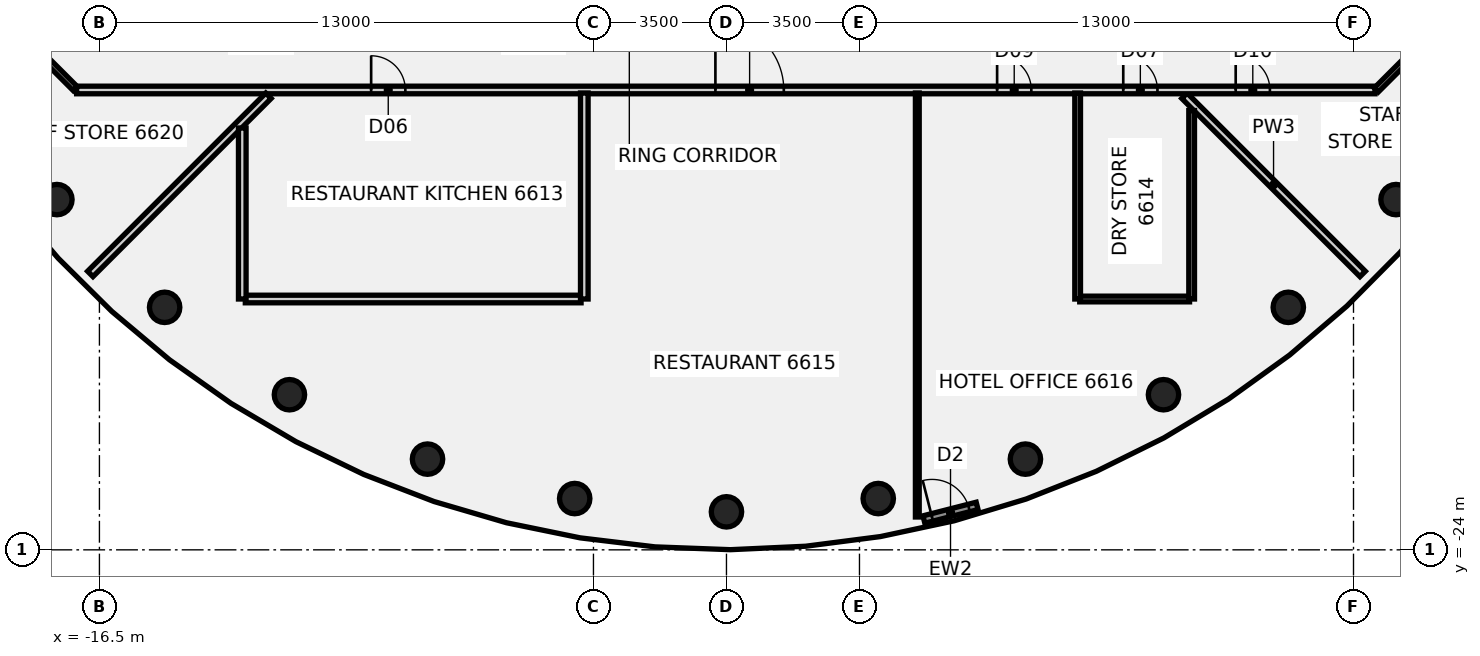
"""IFC4 building model, lengths in metres.
Left out: names, types, materials, properties, quantities, classifications, styles, units other than length and angle.
Written with IfcOpenShell. Run it as: python <this file> out.ifc"""

import sys

from ifc_helpers import new_model, si_unit, direction, frame, frame_2d, origin, origin_2d, place, context, subcontext, project, spatial, rectangle, circle, extrude, element, fill, save


model = new_model("IFC4")
c1 = context("Model", 3, precision=1e-05, world=origin(), true_north=direction((0.0, 1.0)))
c2 = subcontext(c1, "Body", "Model", "MODEL_VIEW")
j1 = project(units=[si_unit("LENGTHUNIT", "METRE"), si_unit("PLANEANGLEUNIT", "RADIAN")], contexts=[c1])
p1 = place(None, origin())
s1 = spatial("IfcSite", under=j1, at=p1, CompositionType="ELEMENT")
p2 = place(p1, origin())
s2 = spatial("IfcBuilding", under=s1, at=p2, CompositionType="ELEMENT")
p3 = place(p2, frame((0.0, 0.0, 260.4)))
s3 = spatial("IfcBuildingStorey", under=s2, at=p3, CompositionType="ELEMENT", Elevation=260.4)
for number, where, z_axis, x_axis in (
    (1, (-17.619, -14.784, -0.14), (0.0, 0.0, 1.0), (1.0, 0.0, 0.0)),
    (2, (-14.784, -17.619, -0.14), (0.0, 0.0, 1.0), (1.0, 0.0, 0.0)),
    (3, (-11.5, -19.919, -0.14), (0.0, 0.0, 1.0), (1.0, 0.0, 0.0)),
    (4, (-7.866, -21.613, -0.14), (0.0, 0.0, 1.0), (1.0, 0.0, 0.0)),
    (5, (-3.994, -22.651, -0.14), (0.0, 0.0, 1.0), (1.0, 0.0, 0.0)),
    (6, (0.0, -23.0, -0.14), (0.0, 0.0, 1.0), (1.0, 0.0, 0.0)),
    (7, (3.994, -22.651, -0.14), (0.0, 0.0, 1.0), (1.0, 0.0, 0.0)),
    (8, (7.866, -21.613, -0.14), (0.0, 0.0, 1.0), (1.0, 0.0, 0.0)),
    (9, (11.5, -19.919, -0.14), (0.0, 0.0, 1.0), (1.0, 0.0, 0.0)),
    (10, (14.784, -17.619, -0.14), (0.0, 0.0, 1.0), (1.0, 0.0, 0.0)),
    (11, (17.619, -14.784, -0.14), (0.0, 0.0, 1.0), (1.0, 0.0, 0.0)),
):
    element("IfcColumn", number, at=place(p3, frame(where, z_axis=z_axis, x_axis=x_axis)), inside=s3, PredefinedType="COLUMN", context=c2, shape_type="SweptSolid", body=[
        extrude(circle(Radius=0.4, at=origin_2d()), origin(), (0.0, 0.0, 1.0), 3.6),
    ])
p4 = place(p3, frame((-18.872, -10.128, 0.0), z_axis=(0.0, 0.0, 1.0), x_axis=(0.707106781187, -0.707106781187, 0.0)))
e12 = element("IfcWall", 12, at=p4, inside=s3, PredefinedType="PARTITIONING", context=c2, shape_type="SweptSolid", body=[
    extrude(rectangle(XDim=2.455, YDim=0.15, at=frame_2d((1.228, 0.0))), origin(), (0.0, 0.0, 1.0), 2.864),
])
p5 = place(p3, frame((12.052, -12.052, 0.0), z_axis=(0.0, 0.0, 1.0), x_axis=(0.707106781187, -0.707106781187, 0.0)))
e13 = element("IfcWall", 13, at=p5, inside=s3, PredefinedType="PARTITIONING", context=c2, shape_type="SweptSolid", body=[
    extrude(rectangle(XDim=6.631, YDim=0.2, at=frame_2d((3.315, 0.0))), origin(), (0.0, 0.0, 1.0), 2.864),
])
p6 = place(p3, frame((-17.1, -11.9, 0.0), z_axis=(0.0, 0.0, 1.0), x_axis=(1.0, 0.0, 0.0)))
e14 = element("IfcWall", 14, at=p6, inside=s3, PredefinedType="PARTITIONING", context=c2, shape_type="SweptSolid", body=[
    extrude(rectangle(XDim=34.165, YDim=0.2, at=frame_2d((17.083, 0.0))), origin(), (0.0, 0.0, 1.0), 2.864),
])
p7 = place(p6, frame((7.75, 0.0, 0.0)))
e15 = element("IfcOpeningElement", 15, at=p7, cuts=e14, PredefinedType="OPENING", context=c2, shape_type="SweptSolid", body=[
    extrude(rectangle(XDim=0.9, YDim=2.1, at=frame_2d((0.45, 1.05))), frame((0.0, 0.11, 0.0), z_axis=(0.0, -1.0, 0.0), x_axis=(1.0, 0.0, 0.0)), (0.0, 0.0, 1.0), 0.22),
])
p8 = place(p6, frame((27.541, 0.0, 0.0)))
e16 = element("IfcOpeningElement", 16, at=p8, cuts=e14, PredefinedType="OPENING", context=c2, shape_type="SweptSolid", body=[
    extrude(rectangle(XDim=0.9, YDim=2.1, at=frame_2d((0.45, 1.05))), frame((0.0, 0.11, 0.0), z_axis=(0.0, -1.0, 0.0), x_axis=(1.0, 0.0, 0.0)), (0.0, 0.0, 1.0), 0.22),
])
p9 = place(p6, frame((16.809, 0.0, 0.0)))
e17 = element("IfcOpeningElement", 17, at=p9, cuts=e14, PredefinedType="OPENING", context=c2, shape_type="SweptSolid", body=[
    extrude(rectangle(XDim=1.8, YDim=2.1, at=frame_2d((0.9, 1.05))), frame((0.0, 0.11, 0.0), z_axis=(0.0, -1.0, 0.0), x_axis=(1.0, 0.0, 0.0)), (0.0, 0.0, 1.0), 0.22),
])
p10 = place(p6, frame((24.222, 0.0, 0.0)))
e18 = element("IfcOpeningElement", 18, at=p10, cuts=e14, PredefinedType="OPENING", context=c2, shape_type="SweptSolid", body=[
    extrude(rectangle(XDim=0.9, YDim=2.1, at=frame_2d((0.45, 1.05))), frame((0.0, 0.11, 0.0), z_axis=(0.0, -1.0, 0.0), x_axis=(1.0, 0.0, 0.0)), (0.0, 0.0, 1.0), 0.22),
])
p11 = place(p6, frame((30.5, 0.0, 0.0)))
e19 = element("IfcOpeningElement", 19, at=p11, cuts=e14, PredefinedType="OPENING", context=c2, shape_type="SweptSolid", body=[
    extrude(rectangle(XDim=0.9, YDim=2.1, at=frame_2d((0.45, 1.05))), frame((0.0, 0.11, 0.0), z_axis=(0.0, -1.0, 0.0), x_axis=(1.0, 0.0, 0.0)), (0.0, 0.0, 1.0), 0.22),
])
p12 = place(p3, frame((-12.661, -17.4, 0.0), z_axis=(0.0, 0.0, 1.0), x_axis=(1.0, 0.0, 0.0)))
e20 = element("IfcWall", 20, at=p12, inside=s3, PredefinedType="PARTITIONING", context=c2, shape_type="SweptSolid", body=[
    extrude(rectangle(XDim=8.835, YDim=0.2, at=frame_2d((4.417, 0.0))), origin(), (0.0, 0.0, 1.0), 2.864),
])
p13 = place(p3, frame((9.296, -17.4, 0.0), z_axis=(0.0, 0.0, 1.0), x_axis=(1.0, 0.0, 0.0)))
e21 = element("IfcWall", 21, at=p13, inside=s3, PredefinedType="PARTITIONING", context=c2, shape_type="SweptSolid", body=[
    extrude(rectangle(XDim=2.89, YDim=0.15, at=frame_2d((1.445, 0.0))), origin(), (0.0, 0.0, 1.0), 2.864),
])
p14 = place(p3, frame((-16.74, -16.74, 0.0), z_axis=(0.0, 0.0, 1.0), x_axis=(0.707106781187, 0.707106781187, 0.0)))
e22 = element("IfcWall", 22, at=p14, inside=s3, PredefinedType="PARTITIONING", context=c2, shape_type="SweptSolid", body=[
    extrude(rectangle(XDim=6.631, YDim=0.2, at=frame_2d((3.315, 0.0))), origin(), (0.0, 0.0, 1.0), 2.864),
])
p15 = place(p3, frame((17.1, -11.9, 0.0), z_axis=(0.0, 0.0, 1.0), x_axis=(0.707106781187, 0.707106781187, 0.0)))
e23 = element("IfcWall", 23, at=p15, inside=s3, PredefinedType="PARTITIONING", context=c2, shape_type="SweptSolid", body=[
    extrude(rectangle(XDim=2.505, YDim=0.15, at=frame_2d((1.253, 0.0))), origin(), (0.0, 0.0, 1.0), 2.864),
])
p16 = place(p3, frame((-12.741, -17.4, 0.0), z_axis=(0.0, 0.0, 1.0), x_axis=(0.0, 1.0, 0.0)))
e24 = element("IfcWall", 24, at=p16, inside=s3, PredefinedType="PARTITIONING", context=c2, shape_type="SweptSolid", body=[
    extrude(rectangle(XDim=4.499, YDim=0.2, at=frame_2d((2.25, 0.0))), origin(), (0.0, 0.0, 1.0), 2.864),
])
p17 = place(p3, frame((-3.741, -17.4, 0.0), z_axis=(0.0, 0.0, 1.0), x_axis=(0.0, 1.0, 0.0)))
e25 = element("IfcWall", 25, at=p17, inside=s3, PredefinedType="PARTITIONING", context=c2, shape_type="SweptSolid", body=[
    extrude(rectangle(XDim=5.42, YDim=0.2, at=frame_2d((2.71, 0.0))), origin(), (0.0, 0.0, 1.0), 2.864),
])
p18 = place(p3, frame((5.022, -23.136, 0.0), z_axis=(0.0, 0.0, 1.0), x_axis=(0.0, 1.0, 0.0)))
e26 = element("IfcWall", 26, at=p18, inside=s3, PredefinedType="PARTITIONING", context=c2, shape_type="SweptSolid", body=[
    extrude(rectangle(XDim=11.156, YDim=0.1, at=frame_2d((5.578, 0.0))), origin(), (0.0, 0.0, 1.0), 2.864),
])
p19 = place(p3, frame((9.241, -17.4, 0.0), z_axis=(0.0, 0.0, 1.0), x_axis=(0.0, 1.0, 0.0)))
e27 = element("IfcWall", 27, at=p19, inside=s3, PredefinedType="PARTITIONING", context=c2, shape_type="SweptSolid", body=[
    extrude(rectangle(XDim=5.42, YDim=0.15, at=frame_2d((2.71, 0.0))), origin(), (0.0, 0.0, 1.0), 2.864),
])
p20 = place(p3, frame((12.241, -17.4, 0.0), z_axis=(0.0, 0.0, 1.0), x_axis=(0.0, 1.0, 0.0)))
e28 = element("IfcWall", 28, at=p20, inside=s3, PredefinedType="PARTITIONING", context=c2, shape_type="SweptSolid", body=[
    extrude(rectangle(XDim=4.959, YDim=0.15, at=frame_2d((2.479, 0.0))), origin(), (0.0, 0.0, 1.0), 2.864),
])
p21 = place(p3, frame((5.195, -23.202, 0.0), z_axis=(0.0, 0.0, 1.0), x_axis=(0.968888430265, 0.247497898374, 0.0)))
e29 = element("IfcWall", 29, at=p21, inside=s3, PredefinedType="SOLIDWALL", context=c2, shape_type="SweptSolid", body=[
    extrude(rectangle(XDim=1.446, YDim=0.2, at=frame_2d((0.723, 0.0))), origin(), (0.0, 0.0, 1.0), 3.46),
])
p22 = place(p21, frame((0.223, 0.0, 0.0)))
e30 = element("IfcOpeningElement", 30, at=p22, cuts=e29, PredefinedType="OPENING", context=c2, shape_type="SweptSolid", body=[
    extrude(rectangle(XDim=1.0, YDim=2.4, at=frame_2d((0.5, 1.2))), frame((0.0, 0.11, 0.0), z_axis=(0.0, -1.0, 0.0), x_axis=(1.0, 0.0, 0.0)), (0.0, 0.0, 1.0), 0.22),
])
p23 = place(p7, frame((0.9, 0.0, 0.0), z_axis=(0.0, 0.0, 1.0), x_axis=(-1.0, 0.0, 0.0)))
e31 = element("IfcDoor", 31, at=p23, inside=s3, OperationType="SINGLE_SWING_LEFT", PredefinedType="DOOR", context=c2, shape_type="SweptSolid", body=[
    extrude(rectangle(XDim=0.9, YDim=2.1, at=frame_2d((0.45, 1.05))), frame((0.0, 0.025, 0.0), z_axis=(0.0, -1.0, 0.0), x_axis=(1.0, 0.0, 0.0)), (0.0, 0.0, 1.0), 0.05),
])
fill(e15, e31)
p24 = place(p8, frame((0.9, 0.0, 0.0), z_axis=(0.0, 0.0, 1.0), x_axis=(-1.0, 0.0, 0.0)))
e32 = element("IfcDoor", 32, at=p24, inside=s3, OperationType="SINGLE_SWING_RIGHT", PredefinedType="DOOR", context=c2, shape_type="SweptSolid", body=[
    extrude(rectangle(XDim=0.9, YDim=2.1, at=frame_2d((0.45, 1.05))), frame((0.0, 0.025, 0.0), z_axis=(0.0, -1.0, 0.0), x_axis=(1.0, 0.0, 0.0)), (0.0, 0.0, 1.0), 0.05),
])
fill(e16, e32)
p25 = place(p9, origin())
e33 = element("IfcDoor", 33, at=p25, inside=s3, OperationType="DOUBLE_DOOR_SINGLE_SWING", PredefinedType="DOOR", context=c2, shape_type="SweptSolid", body=[
    extrude(rectangle(XDim=1.8, YDim=2.1, at=frame_2d((0.9, 1.05))), frame((0.0, 0.025, 0.0), z_axis=(0.0, -1.0, 0.0), x_axis=(1.0, 0.0, 0.0)), (0.0, 0.0, 1.0), 0.05),
])
fill(e17, e33)
p26 = place(p10, frame((0.9, 0.0, 0.0), z_axis=(0.0, 0.0, 1.0), x_axis=(-1.0, 0.0, 0.0)))
e34 = element("IfcDoor", 34, at=p26, inside=s3, OperationType="SINGLE_SWING_RIGHT", PredefinedType="DOOR", context=c2, shape_type="SweptSolid", body=[
    extrude(rectangle(XDim=0.9, YDim=2.1, at=frame_2d((0.45, 1.05))), frame((0.0, 0.025, 0.0), z_axis=(0.0, -1.0, 0.0), x_axis=(1.0, 0.0, 0.0)), (0.0, 0.0, 1.0), 0.05),
])
fill(e18, e34)
p27 = place(p11, frame((0.9, 0.0, 0.0), z_axis=(0.0, 0.0, 1.0), x_axis=(-1.0, 0.0, 0.0)))
e35 = element("IfcDoor", 35, at=p27, inside=s3, OperationType="SINGLE_SWING_RIGHT", PredefinedType="DOOR", context=c2, shape_type="SweptSolid", body=[
    extrude(rectangle(XDim=0.9, YDim=2.1, at=frame_2d((0.45, 1.05))), frame((0.0, 0.025, 0.0), z_axis=(0.0, -1.0, 0.0), x_axis=(1.0, 0.0, 0.0)), (0.0, 0.0, 1.0), 0.05),
])
fill(e19, e35)
p28 = place(p22, origin())
e36 = element("IfcDoor", 36, at=p28, inside=s3, OperationType="SINGLE_SWING_LEFT", PredefinedType="DOOR", context=c2, shape_type="SweptSolid", body=[
    extrude(rectangle(XDim=1.0, YDim=2.4, at=frame_2d((0.5, 1.2))), frame((0.0, 0.025, 0.0), z_axis=(0.0, -1.0, 0.0), x_axis=(1.0, 0.0, 0.0)), (0.0, 0.0, 1.0), 0.05),
])
fill(e30, e36)
save(model, sys.argv[1])
